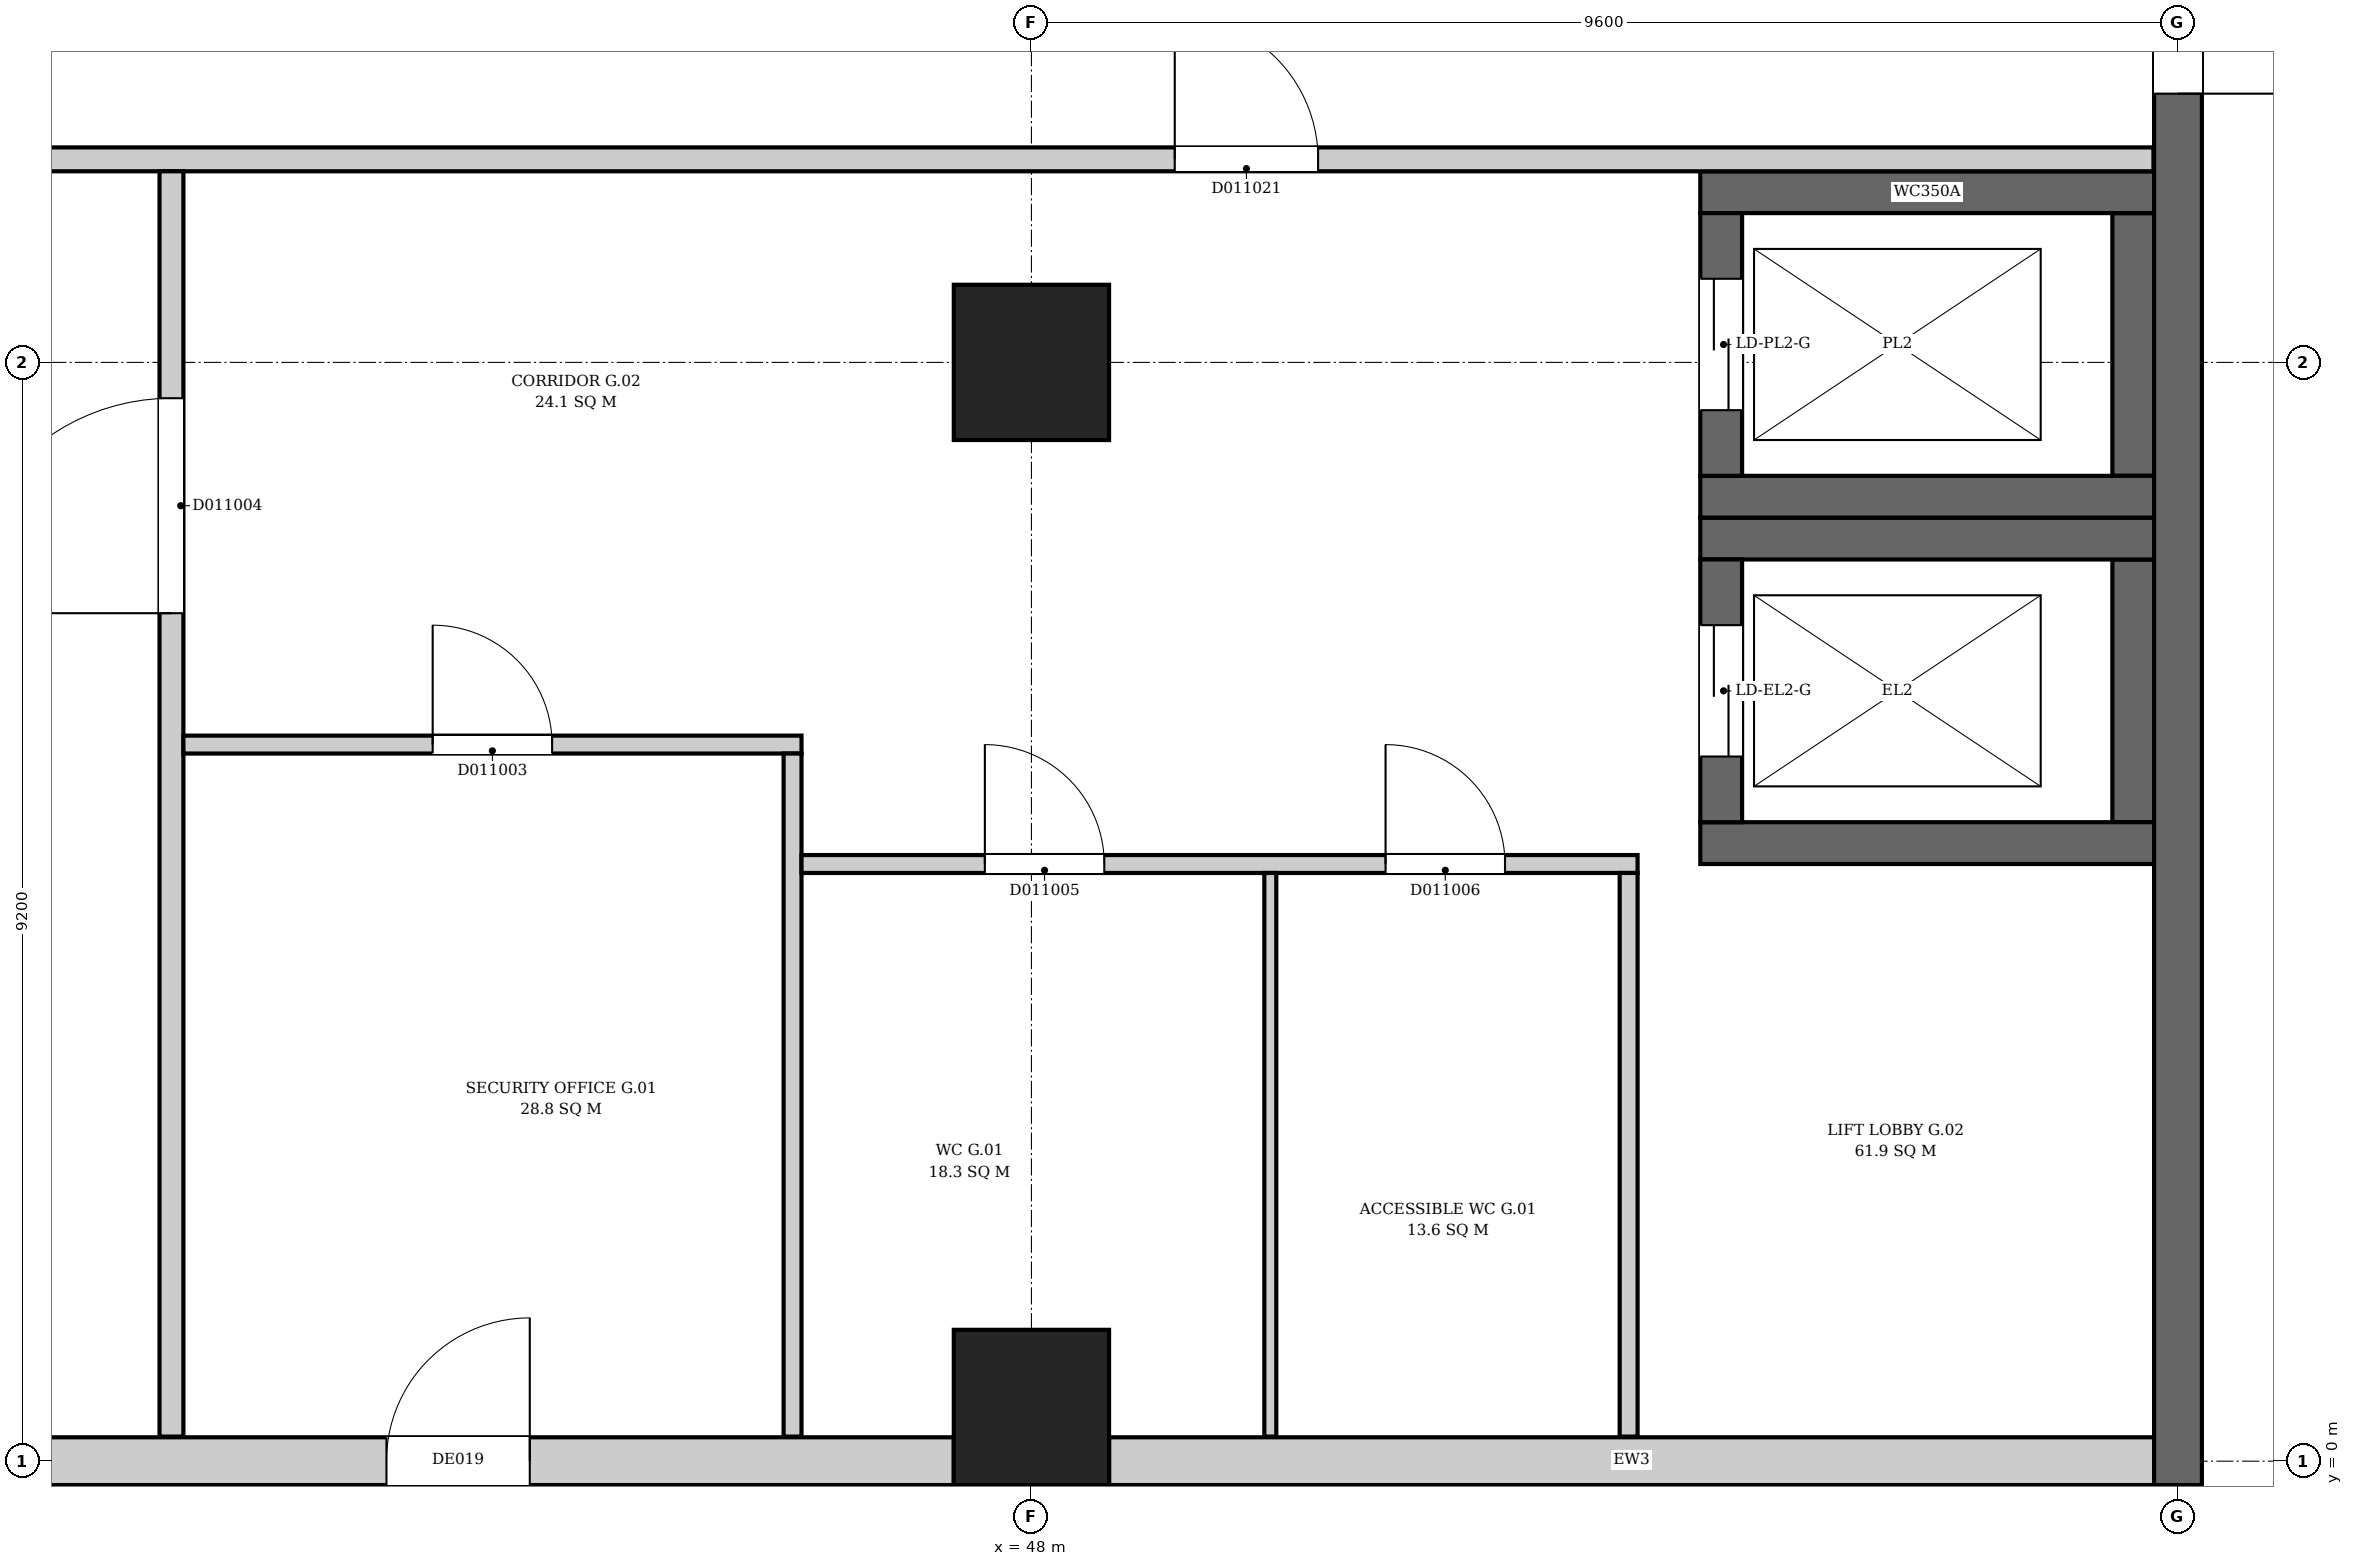
"""IFC4 building model, lengths in metres.
Left out: names, types, materials, properties, quantities, classifications, styles, units other than length and angle.
Written with IfcOpenShell. Run it as: python <this file> out.ifc"""

import sys

from ifc_helpers import new_model, si_unit, direction, frame, frame_2d, origin, origin_2d, place, context, subcontext, project, spatial, rectangle, extrude, element, fill, save


model = new_model("IFC4")
c1 = context("Model", 3, precision=1e-05, world=origin(), true_north=direction((0.0, 1.0)))
c2 = subcontext(c1, "Body", "Model", "MODEL_VIEW")
j1 = project(units=[si_unit("LENGTHUNIT", "METRE"), si_unit("PLANEANGLEUNIT", "RADIAN")], contexts=[c1])
p1 = place(None, origin())
s1 = spatial("IfcSite", under=j1, at=p1, CompositionType="ELEMENT")
p2 = place(p1, origin())
s2 = spatial("IfcBuilding", under=s1, at=p2, CompositionType="ELEMENT")
p3 = place(p2, origin())
s3 = spatial("IfcBuildingStorey", under=s2, at=p3, CompositionType="ELEMENT", Elevation=0.0)
p4 = place(p3, frame((57.6, -0.2, 0.0), z_axis=(0.0, 0.0, 1.0), x_axis=(0.0, 1.0, 0.0)))
e1 = element("IfcWall", 1, at=p4, inside=s3, PredefinedType="SHEAR", context=c2, shape_type="SweptSolid", body=[
    extrude(rectangle(XDim=46.88, YDim=0.4, at=frame_2d((23.44, 0.0))), origin(), (0.0, 0.0, 1.0), 6.5),
])
p5 = place(p4, frame((11.65, 0.0, 0.0)))
e2 = element("IfcOpeningElement", 2, at=p5, cuts=e1, PredefinedType="OPENING", context=c2, shape_type="SweptSolid", body=[
    extrude(rectangle(XDim=3.0, YDim=2.4, at=frame_2d((1.5, 1.2))), frame((0.0, 0.21, 0.0), z_axis=(0.0, -1.0, 0.0), x_axis=(1.0, 0.0, 0.0)), (0.0, 0.0, 1.0), 0.42),
])
p6 = place(p4, frame((38.2, 0.0, 0.0)))
e3 = element("IfcOpeningElement", 3, at=p6, cuts=e1, PredefinedType="OPENING", context=c2, shape_type="SweptSolid", body=[
    extrude(rectangle(XDim=3.0, YDim=2.4, at=frame_2d((1.5, 1.2))), frame((0.0, 0.21, 0.0), z_axis=(0.0, -1.0, 0.0), x_axis=(1.0, 0.0, 0.0)), (0.0, 0.0, 1.0), 0.42),
])
for number, where, z_axis, x_axis in (
    (4, (53.6, 5.175, 0.0), (0.0, 0.0, 1.0), (1.0, 0.0, 0.0)),
    (5, (53.6, 7.725, 0.0), (0.0, 0.0, 1.0), (1.0, 0.0, 0.0)),
):
    element("IfcWall", number, at=place(p3, frame(where, z_axis=z_axis, x_axis=x_axis)), inside=s3, PredefinedType="SHEAR", context=c2, shape_type="SweptSolid", body=[
        extrude(rectangle(XDim=3.8, YDim=0.35, at=frame_2d((1.9, 0.0))), origin(), (0.0, 0.0, 1.0), 6.5),
    ])
p7 = place(p3, frame((53.775, 5.35, 0.0), z_axis=(0.0, 0.0, 1.0), x_axis=(0.0, 1.0, 0.0)))
e6 = element("IfcWall", 6, at=p7, inside=s3, PredefinedType="SHEAR", context=c2, shape_type="SweptSolid", body=[
    extrude(rectangle(XDim=2.2, YDim=0.35, at=frame_2d((1.1, 0.0))), origin(), (0.0, 0.0, 1.0), 6.5),
])
p8 = place(p7, frame((0.55, 0.0, 0.0)))
e7 = element("IfcOpeningElement", 7, at=p8, cuts=e6, PredefinedType="OPENING", context=c2, shape_type="SweptSolid", body=[
    extrude(rectangle(XDim=1.1, YDim=2.1, at=frame_2d((0.55, 1.05))), frame((0.0, 0.185, 0.0), z_axis=(0.0, -1.0, 0.0), x_axis=(1.0, 0.0, 0.0)), (0.0, 0.0, 1.0), 0.37),
])
p9 = place(p3, frame((57.225, 5.35, 0.0), z_axis=(0.0, 0.0, 1.0), x_axis=(0.0, 1.0, 0.0)))
e8 = element("IfcWall", 8, at=p9, inside=s3, PredefinedType="SHEAR", context=c2, shape_type="SweptSolid", body=[
    extrude(rectangle(XDim=2.2, YDim=0.35, at=frame_2d((1.1, 0.0))), origin(), (0.0, 0.0, 1.0), 6.5),
])
for number, where, z_axis, x_axis in (
    (9, (53.6, 8.075, 0.0), (0.0, 0.0, 1.0), (1.0, 0.0, 0.0)),
    (10, (53.6, 10.625, 0.0), (0.0, 0.0, 1.0), (1.0, 0.0, 0.0)),
):
    element("IfcWall", number, at=place(p3, frame(where, z_axis=z_axis, x_axis=x_axis)), inside=s3, PredefinedType="SHEAR", context=c2, shape_type="SweptSolid", body=[
        extrude(rectangle(XDim=3.8, YDim=0.35, at=frame_2d((1.9, 0.0))), origin(), (0.0, 0.0, 1.0), 6.5),
    ])
p10 = place(p3, frame((53.775, 8.25, 0.0), z_axis=(0.0, 0.0, 1.0), x_axis=(0.0, 1.0, 0.0)))
e11 = element("IfcWall", 11, at=p10, inside=s3, PredefinedType="SHEAR", context=c2, shape_type="SweptSolid", body=[
    extrude(rectangle(XDim=2.2, YDim=0.35, at=frame_2d((1.1, 0.0))), origin(), (0.0, 0.0, 1.0), 6.5),
])
p11 = place(p10, frame((0.55, 0.0, 0.0)))
e12 = element("IfcOpeningElement", 12, at=p11, cuts=e11, PredefinedType="OPENING", context=c2, shape_type="SweptSolid", body=[
    extrude(rectangle(XDim=1.1, YDim=2.1, at=frame_2d((0.55, 1.05))), frame((0.0, 0.185, 0.0), z_axis=(0.0, -1.0, 0.0), x_axis=(1.0, 0.0, 0.0)), (0.0, 0.0, 1.0), 0.37),
])
p12 = place(p3, frame((57.225, 8.25, 0.0), z_axis=(0.0, 0.0, 1.0), x_axis=(0.0, 1.0, 0.0)))
e13 = element("IfcWall", 13, at=p12, inside=s3, PredefinedType="SHEAR", context=c2, shape_type="SweptSolid", body=[
    extrude(rectangle(XDim=2.2, YDim=0.35, at=frame_2d((1.1, 0.0))), origin(), (0.0, 0.0, 1.0), 6.5),
])
for number, where, z_axis, x_axis in (
    (14, (48.0, 0.45, 0.0), (0.0, 0.0, 1.0), (1.0, 0.0, 0.0)),
    (15, (48.0, 9.2, 0.0), (0.0, 0.0, 1.0), (1.0, 0.0, 0.0)),
):
    element("IfcColumn", number, at=place(p3, frame(where, z_axis=z_axis, x_axis=x_axis)), inside=s3, PredefinedType="COLUMN", context=c2, shape_type="SweptSolid", body=[
        extrude(rectangle(XDim=1.3, YDim=1.3, at=origin_2d()), origin(), (0.0, 0.0, 1.0), 6.5),
    ])
p13 = place(p3, frame((39.05, 0.0, 0.0), z_axis=(0.0, 0.0, 1.0), x_axis=(1.0, 0.0, 0.0)))
e16 = element("IfcWall", 16, at=p13, inside=s3, PredefinedType="ELEMENTEDWALL", context=c2, shape_type="SweptSolid", body=[
    extrude(rectangle(XDim=8.3, YDim=0.4, at=frame_2d((4.15, 0.0))), origin(), (0.0, 0.0, 1.0), 6.15),
])
p14 = place(p13, frame((3.55, 0.0, 0.0)))
e17 = element("IfcOpeningElement", 17, at=p14, cuts=e16, PredefinedType="OPENING", context=c2, shape_type="SweptSolid", body=[
    extrude(rectangle(XDim=1.2, YDim=2.2, at=frame_2d((0.6, 1.1))), frame((0.0, 0.21, 0.0), z_axis=(0.0, -1.0, 0.0), x_axis=(1.0, 0.0, 0.0)), (0.0, 0.0, 1.0), 0.42),
])
p15 = place(p3, frame((48.65, 0.0, 0.0), z_axis=(0.0, 0.0, 1.0), x_axis=(1.0, 0.0, 0.0)))
e18 = element("IfcWall", 18, at=p15, inside=s3, PredefinedType="ELEMENTEDWALL", context=c2, shape_type="SweptSolid", body=[
    extrude(rectangle(XDim=8.75, YDim=0.4, at=frame_2d((4.375, 0.0))), origin(), (0.0, 0.0, 1.0), 6.15),
])
p16 = place(p3, frame((7.9, 10.9, 0.0), z_axis=(0.0, 0.0, 1.0), x_axis=(1.0, 0.0, 0.0)))
e19 = element("IfcWall", 19, at=p16, inside=s3, PredefinedType="PARTITIONING", context=c2, shape_type="SweptSolid", body=[
    extrude(rectangle(XDim=49.494, YDim=0.2, at=frame_2d((24.747, 0.0))), origin(), (0.0, 0.0, 1.0), 6.15),
])
p17 = place(p16, frame((41.3, 0.0, 0.0)))
e20 = element("IfcOpeningElement", 20, at=p17, cuts=e19, PredefinedType="OPENING", context=c2, shape_type="SweptSolid", body=[
    extrude(rectangle(XDim=1.2, YDim=2.1, at=frame_2d((0.6, 1.05))), frame((0.0, 0.11, 0.0), z_axis=(0.0, -1.0, 0.0), x_axis=(1.0, 0.0, 0.0)), (0.0, 0.0, 1.0), 0.22),
])
p18 = place(p3, frame((40.8, 0.206, 0.0), z_axis=(0.0, 0.0, 1.0), x_axis=(0.0, 1.0, 0.0)))
e21 = element("IfcWall", 21, at=p18, inside=s3, PredefinedType="PARTITIONING", context=c2, shape_type="SweptSolid", body=[
    extrude(rectangle(XDim=10.594, YDim=0.2, at=frame_2d((5.297, 0.0))), origin(), (0.0, 0.0, 1.0), 6.15),
])
p19 = place(p18, frame((6.894, 0.0, 0.0)))
e22 = element("IfcOpeningElement", 22, at=p19, cuts=e21, PredefinedType="OPENING", context=c2, shape_type="SweptSolid", body=[
    extrude(rectangle(XDim=1.8, YDim=2.1, at=frame_2d((0.9, 1.05))), frame((0.0, 0.11, 0.0), z_axis=(0.0, -1.0, 0.0), x_axis=(1.0, 0.0, 0.0)), (0.0, 0.0, 1.0), 0.22),
])
p20 = place(p3, frame((40.9, 6.0, 0.0), z_axis=(0.0, 0.0, 1.0), x_axis=(1.0, 0.0, 0.0)))
e23 = element("IfcWall", 23, at=p20, inside=s3, PredefinedType="PARTITIONING", context=c2, shape_type="SweptSolid", body=[
    extrude(rectangle(XDim=5.175, YDim=0.15, at=frame_2d((2.587, 0.0))), origin(), (0.0, 0.0, 1.0), 6.15),
])
p21 = place(p20, frame((2.087, 0.0, 0.0)))
e24 = element("IfcOpeningElement", 24, at=p21, cuts=e23, PredefinedType="OPENING", context=c2, shape_type="SweptSolid", body=[
    extrude(rectangle(XDim=1.0, YDim=2.1, at=frame_2d((0.5, 1.05))), frame((0.0, 0.085, 0.0), z_axis=(0.0, -1.0, 0.0), x_axis=(1.0, 0.0, 0.0)), (0.0, 0.0, 1.0), 0.17),
])
p22 = place(p3, frame((46.0, 0.206, 0.0), z_axis=(0.0, 0.0, 1.0), x_axis=(0.0, 1.0, 0.0)))
e25 = element("IfcWall", 25, at=p22, inside=s3, PredefinedType="PARTITIONING", context=c2, shape_type="SweptSolid", body=[
    extrude(rectangle(XDim=5.719, YDim=0.15, at=frame_2d((2.859, 0.0))), origin(), (0.0, 0.0, 1.0), 6.15),
])
p23 = place(p3, frame((46.075, 5.0, 0.0), z_axis=(0.0, 0.0, 1.0), x_axis=(1.0, 0.0, 0.0)))
e26 = element("IfcWall", 26, at=p23, inside=s3, PredefinedType="PARTITIONING", context=c2, shape_type="SweptSolid", body=[
    extrude(rectangle(XDim=7.0, YDim=0.15, at=frame_2d((3.5, 0.0))), origin(), (0.0, 0.0, 1.0), 6.15),
])
p24 = place(p23, frame((1.535, 0.0, 0.0)))
e27 = element("IfcOpeningElement", 27, at=p24, cuts=e26, PredefinedType="OPENING", context=c2, shape_type="SweptSolid", body=[
    extrude(rectangle(XDim=1.0, YDim=2.1, at=frame_2d((0.5, 1.05))), frame((0.0, 0.085, 0.0), z_axis=(0.0, -1.0, 0.0), x_axis=(1.0, 0.0, 0.0)), (0.0, 0.0, 1.0), 0.17),
])
p25 = place(p23, frame((4.89, 0.0, 0.0)))
e28 = element("IfcOpeningElement", 28, at=p25, cuts=e26, PredefinedType="OPENING", context=c2, shape_type="SweptSolid", body=[
    extrude(rectangle(XDim=1.0, YDim=2.1, at=frame_2d((0.5, 1.05))), frame((0.0, 0.085, 0.0), z_axis=(0.0, -1.0, 0.0), x_axis=(1.0, 0.0, 0.0)), (0.0, 0.0, 1.0), 0.17),
])
p26 = place(p3, frame((50.0, 0.206, 0.0), z_axis=(0.0, 0.0, 1.0), x_axis=(0.0, 1.0, 0.0)))
e29 = element("IfcWall", 29, at=p26, inside=s3, PredefinedType="PARTITIONING", context=c2, shape_type="SweptSolid", body=[
    extrude(rectangle(XDim=4.719, YDim=0.1, at=frame_2d((2.359, 0.0))), origin(), (0.0, 0.0, 1.0), 6.15),
])
p27 = place(p3, frame((53.0, 0.206, 0.0), z_axis=(0.0, 0.0, 1.0), x_axis=(0.0, 1.0, 0.0)))
e30 = element("IfcWall", 30, at=p27, inside=s3, PredefinedType="PARTITIONING", context=c2, shape_type="SweptSolid", body=[
    extrude(rectangle(XDim=4.719, YDim=0.15, at=frame_2d((2.359, 0.0))), origin(), (0.0, 0.0, 1.0), 6.15),
])
p28 = place(p14, frame((1.2, 0.0, 0.0), z_axis=(0.0, 0.0, 1.0), x_axis=(-1.0, 0.0, 0.0)))
e31 = element("IfcDoor", 31, at=p28, inside=s3, OperationType="SINGLE_SWING_LEFT", PredefinedType="DOOR", context=c2, shape_type="SweptSolid", body=[
    extrude(rectangle(XDim=1.2, YDim=2.2, at=frame_2d((0.6, 1.1))), frame((0.0, 0.025, 0.0), z_axis=(0.0, -1.0, 0.0), x_axis=(1.0, 0.0, 0.0)), (0.0, 0.0, 1.0), 0.05),
])
fill(e17, e31)
p29 = place(p5, frame((3.0, 0.0, 0.0), z_axis=(0.0, 0.0, 1.0), x_axis=(-1.0, 0.0, 0.0)))
e32 = element("IfcDoor", 32, at=p29, inside=s3, OperationType="DOUBLE_DOOR_SINGLE_SWING", PredefinedType="DOOR", context=c2, shape_type="SweptSolid", body=[
    extrude(rectangle(XDim=3.0, YDim=2.4, at=frame_2d((1.5, 1.2))), frame((0.0, 0.025, 0.0), z_axis=(0.0, -1.0, 0.0), x_axis=(1.0, 0.0, 0.0)), (0.0, 0.0, 1.0), 0.05),
])
fill(e2, e32)
p30 = place(p8, origin())
e33 = element("IfcDoor", 33, at=p30, inside=s3, OperationType="DOUBLE_DOOR_SLIDING", PredefinedType="DOOR", context=c2, shape_type="SweptSolid", body=[
    extrude(rectangle(XDim=1.1, YDim=2.1, at=frame_2d((0.55, 1.05))), frame((0.0, 0.025, 0.0), z_axis=(0.0, -1.0, 0.0), x_axis=(1.0, 0.0, 0.0)), (0.0, 0.0, 1.0), 0.05),
])
fill(e7, e33)
p31 = place(p11, origin())
e34 = element("IfcDoor", 34, at=p31, inside=s3, OperationType="DOUBLE_DOOR_SLIDING", PredefinedType="DOOR", context=c2, shape_type="SweptSolid", body=[
    extrude(rectangle(XDim=1.1, YDim=2.1, at=frame_2d((0.55, 1.05))), frame((0.0, 0.025, 0.0), z_axis=(0.0, -1.0, 0.0), x_axis=(1.0, 0.0, 0.0)), (0.0, 0.0, 1.0), 0.05),
])
fill(e12, e34)
p32 = place(p21, origin())
e35 = element("IfcDoor", 35, at=p32, inside=s3, OperationType="SINGLE_SWING_RIGHT", PredefinedType="DOOR", context=c2, shape_type="SweptSolid", body=[
    extrude(rectangle(XDim=1.0, YDim=2.1, at=frame_2d((0.5, 1.05))), frame((0.0, 0.025, 0.0), z_axis=(0.0, -1.0, 0.0), x_axis=(1.0, 0.0, 0.0)), (0.0, 0.0, 1.0), 0.05),
])
fill(e24, e35)
p33 = place(p19, origin())
e36 = element("IfcDoor", 36, at=p33, inside=s3, OperationType="DOUBLE_DOOR_SINGLE_SWING", PredefinedType="DOOR", context=c2, shape_type="SweptSolid", body=[
    extrude(rectangle(XDim=1.8, YDim=2.1, at=frame_2d((0.9, 1.05))), frame((0.0, 0.025, 0.0), z_axis=(0.0, -1.0, 0.0), x_axis=(1.0, 0.0, 0.0)), (0.0, 0.0, 1.0), 0.05),
])
fill(e22, e36)
p34 = place(p24, origin())
e37 = element("IfcDoor", 37, at=p34, inside=s3, OperationType="SINGLE_SWING_RIGHT", PredefinedType="DOOR", context=c2, shape_type="SweptSolid", body=[
    extrude(rectangle(XDim=1.0, YDim=2.1, at=frame_2d((0.5, 1.05))), frame((0.0, 0.025, 0.0), z_axis=(0.0, -1.0, 0.0), x_axis=(1.0, 0.0, 0.0)), (0.0, 0.0, 1.0), 0.05),
])
fill(e27, e37)
p35 = place(p25, origin())
e38 = element("IfcDoor", 38, at=p35, inside=s3, OperationType="SINGLE_SWING_LEFT", PredefinedType="DOOR", context=c2, shape_type="SweptSolid", body=[
    extrude(rectangle(XDim=1.0, YDim=2.1, at=frame_2d((0.5, 1.05))), frame((0.0, 0.025, 0.0), z_axis=(0.0, -1.0, 0.0), x_axis=(1.0, 0.0, 0.0)), (0.0, 0.0, 1.0), 0.05),
])
fill(e28, e38)
p36 = place(p17, origin())
e39 = element("IfcDoor", 39, at=p36, inside=s3, OperationType="SINGLE_SWING_LEFT", PredefinedType="DOOR", context=c2, shape_type="SweptSolid", body=[
    extrude(rectangle(XDim=1.2, YDim=2.1, at=frame_2d((0.6, 1.05))), frame((0.0, 0.025, 0.0), z_axis=(0.0, -1.0, 0.0), x_axis=(1.0, 0.0, 0.0)), (0.0, 0.0, 1.0), 0.05),
])
fill(e20, e39)
save(model, sys.argv[1])
